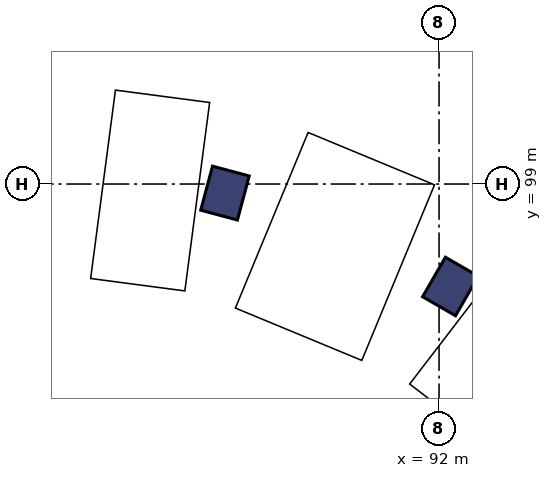
"""IFC4 building model, lengths in metres.
Left out: names, types, materials, properties, quantities, classifications, styles, units other than length and angle.
Written with IfcOpenShell. Run it as: python <this file> out.ifc"""

import sys

from ifc_helpers import new_model, si_unit, direction, frame, origin, origin_2d, place, context, subcontext, project, spatial, rectangle, extrude, element, save


model = new_model("IFC4")
c1 = context("Model", 3, precision=1e-05, world=origin(), true_north=direction((0.0, 1.0)))
c2 = subcontext(c1, "Body", "Model", "MODEL_VIEW")
j1 = project(units=[si_unit("LENGTHUNIT", "METRE"), si_unit("PLANEANGLEUNIT", "RADIAN")], contexts=[c1])
p1 = place(None, origin())
s1 = spatial("IfcSite", under=j1, at=p1, CompositionType="ELEMENT")
p2 = place(p1, origin())
s2 = spatial("IfcBuilding", under=s1, at=p2, CompositionType="ELEMENT")
p3 = place(p2, frame((0.0, 0.0, -9.0)))
s3 = spatial("IfcBuildingStorey", under=s2, at=p3, CompositionType="ELEMENT", Elevation=-9.0)
for number, where, z_axis, x_axis in (
    (1, (92.3, 96.304, 0.0), (0.0, 0.0, 1.0), (0.5, 0.866, 0.0)),
    (2, (86.367, 98.762, 0.0), (0.0, 0.0, 1.0), (0.259, 0.966, 0.0)),
):
    element("IfcColumn", number, at=place(p3, frame(where, z_axis=z_axis, x_axis=x_axis)), inside=s3, PredefinedType="COLUMN", context=c2, shape_type="SweptSolid", body=[
        extrude(rectangle(XDim=1.2, YDim=1.0, at=origin_2d()), origin(), (0.0, 0.0, 1.0), 4.5),
    ])
save(model, sys.argv[1])
